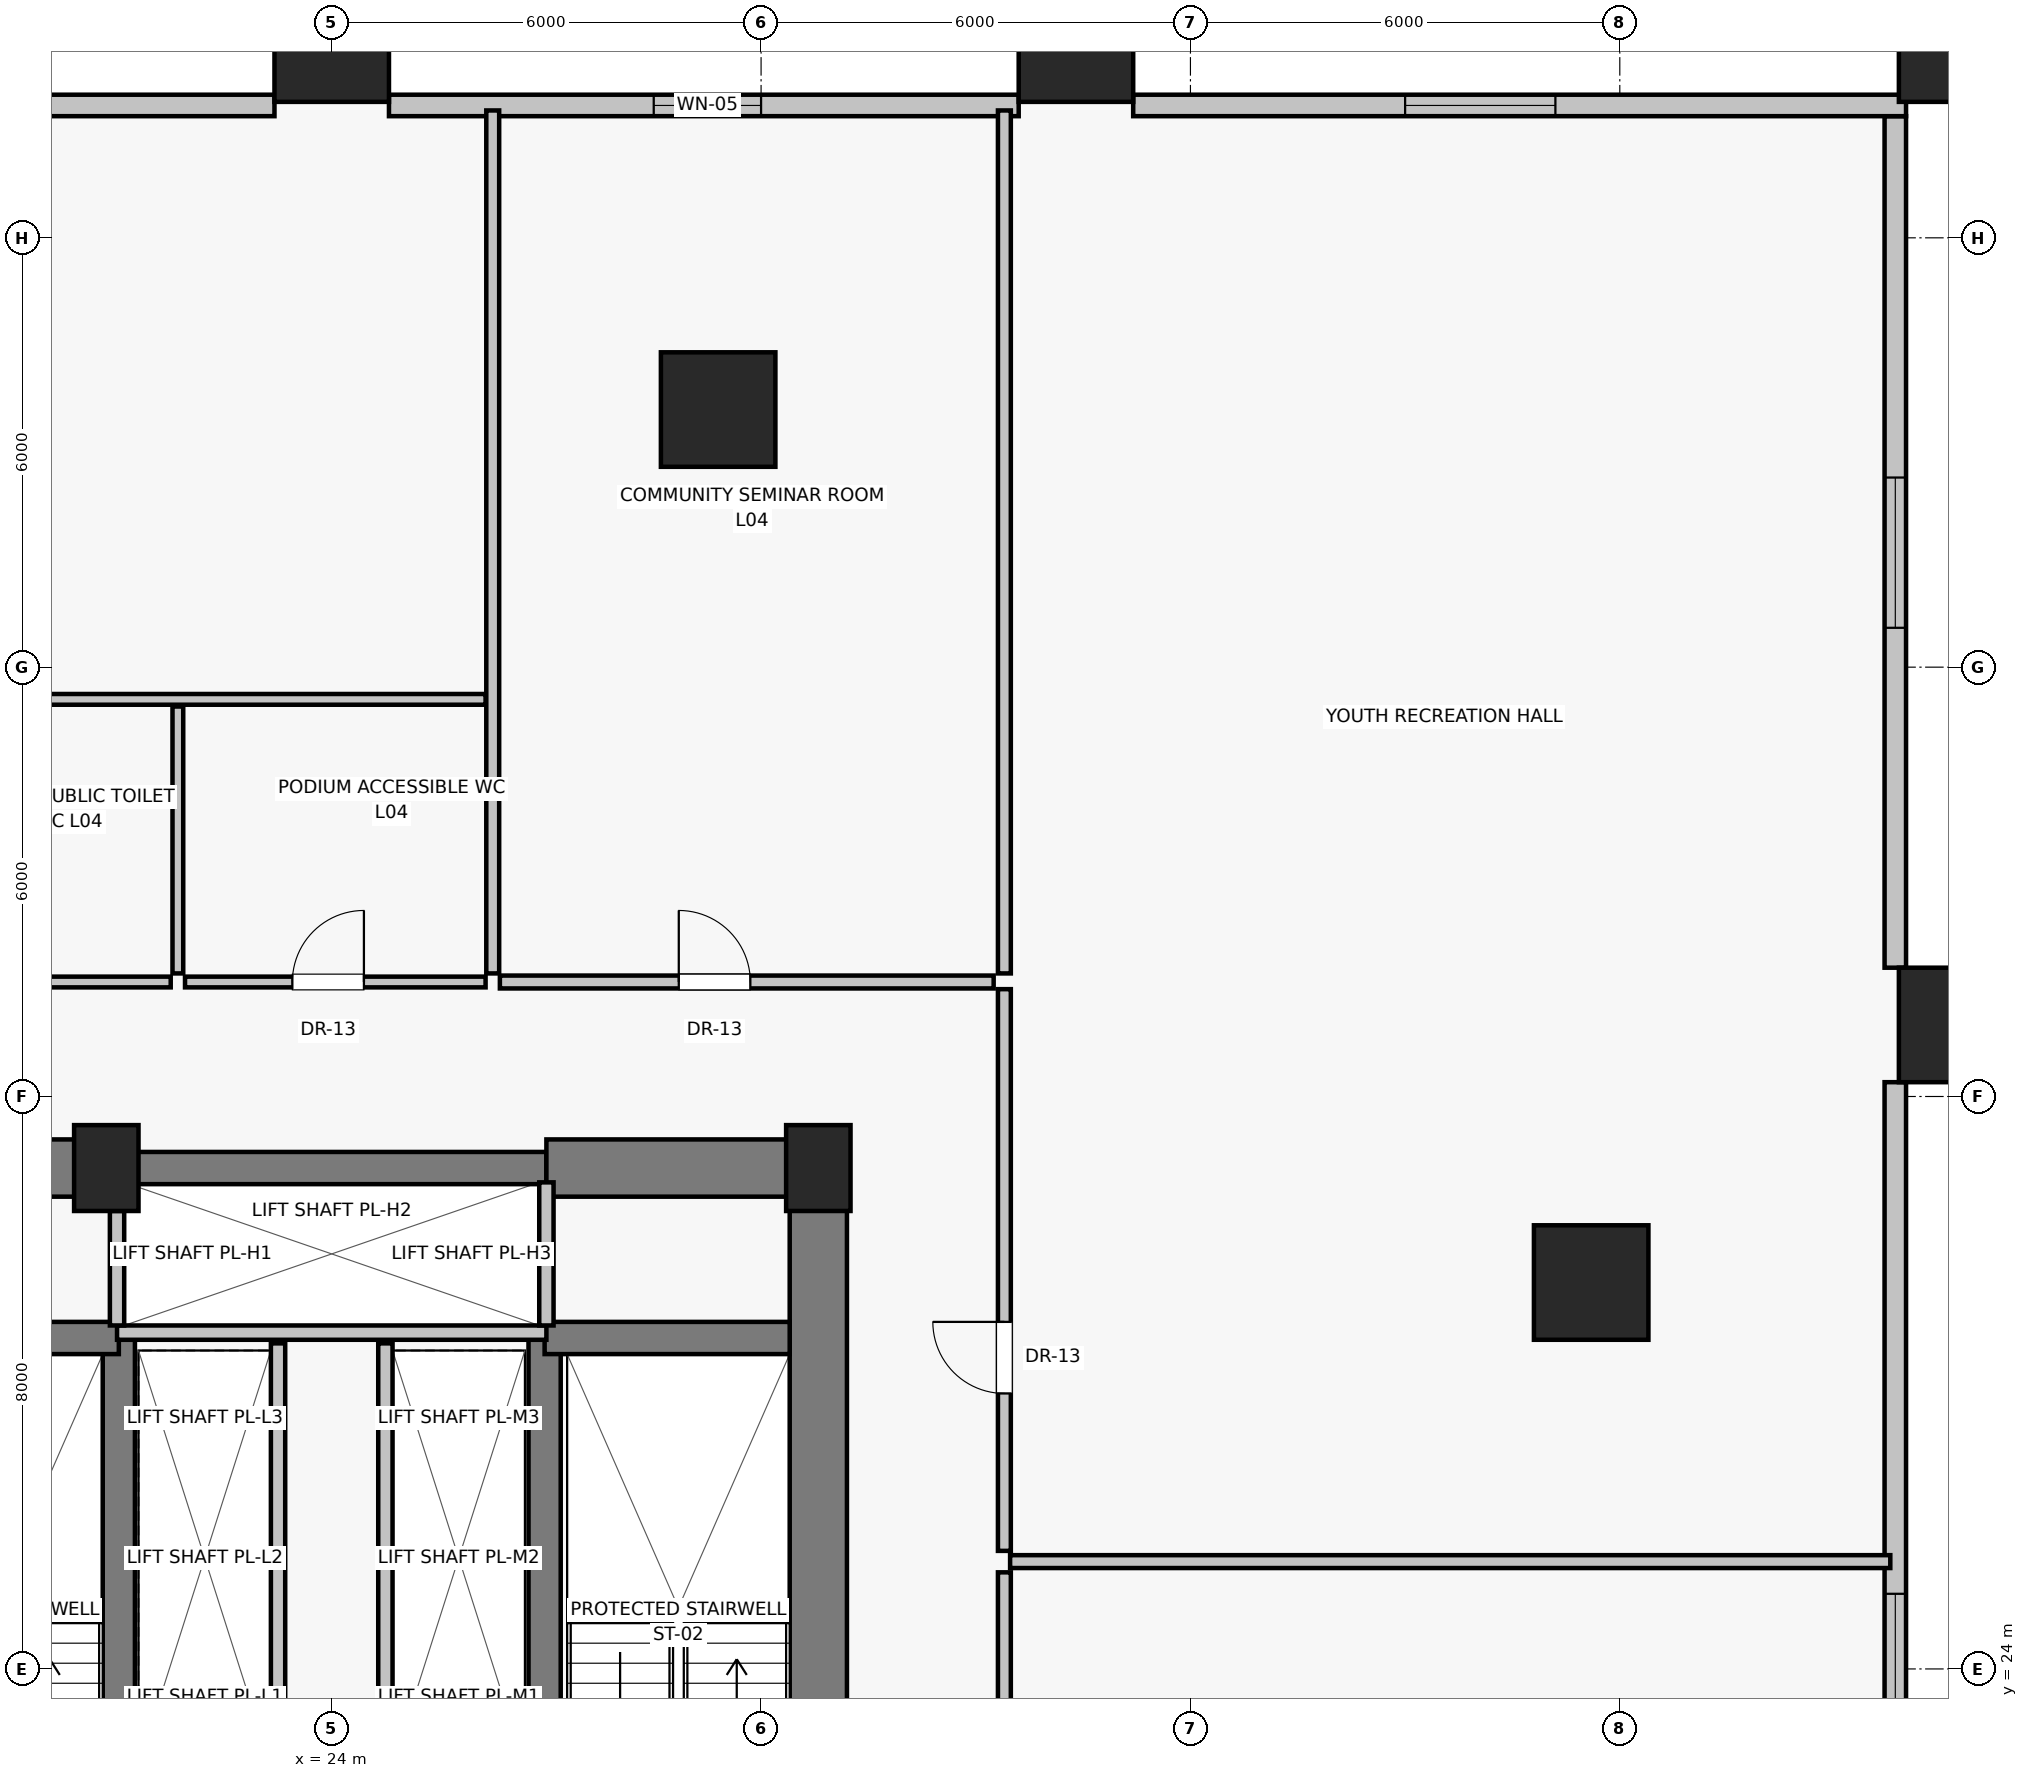
"""IFC4 building model, lengths in metres.
Left out: names, types, materials, properties, quantities, classifications, styles, units other than length and angle.
Written with IfcOpenShell. Run it as: python <this file> out.ifc"""

import sys

from ifc_helpers import new_model, si_unit, direction, frame, frame_2d, origin, origin_2d, place, context, subcontext, project, spatial, rectangle, extrude, source, transform, mapped, element, fill, save


model = new_model("IFC4")
c1 = context("Model", 3, precision=1e-05, world=origin(), true_north=direction((0.0, 1.0)))
c2 = subcontext(c1, "Body", "Model", "MODEL_VIEW")
j1 = project(units=[si_unit("LENGTHUNIT", "METRE"), si_unit("PLANEANGLEUNIT", "RADIAN")], contexts=[c1])
p1 = place(None, origin())
s1 = spatial("IfcSite", under=j1, at=p1, CompositionType="ELEMENT")
p2 = place(p1, origin())
s2 = spatial("IfcBuilding", under=s1, at=p2, CompositionType="ELEMENT")
p3 = place(p2, frame((0.0, 0.0, 18.4)))
s3 = spatial("IfcBuildingStorey", under=s2, at=p3, CompositionType="ELEMENT", Elevation=18.4)
for number, where, z_axis, x_axis in (
    (1, (20.85, 31.0, 0.0), (0.0, 0.0, 1.0), (1.0, 0.0, 0.0)),
    (2, (30.8, 31.0, 0.0), (0.0, 0.0, 1.0), (1.0, 0.0, 0.0)),
):
    element("IfcColumn", number, at=place(p3, frame(where, z_axis=z_axis, x_axis=x_axis)), inside=s3, PredefinedType="PILASTER", context=c2, shape_type="SweptSolid", body=[
        extrude(rectangle(XDim=0.9, YDim=1.2, at=origin_2d()), origin(), (0.0, 0.0, 1.0), 4.4),
    ])
for number, where, z_axis, x_axis in (
    (3, (46.7, 33.0, 0.0), (0.0, 0.0, 1.0), (1.0, 0.0, 0.0)),
    (4, (24.0, 46.7, 0.0), (0.0, 0.0, 1.0), (1.0, 0.0, 0.0)),
    (5, (34.4, 46.7, 0.0), (0.0, 0.0, 1.0), (1.0, 0.0, 0.0)),
    (6, (46.7, 46.7, 0.0), (0.0, 0.0, 1.0), (1.0, 0.0, 0.0)),
    (7, (41.6, 29.4, 0.0), (0.0, 0.0, 1.0), (1.0, 0.0, 0.0)),
    (8, (29.4, 41.6, 0.0), (0.0, 0.0, 1.0), (1.0, 0.0, 0.0)),
):
    element("IfcColumn", number, at=place(p3, frame(where, z_axis=z_axis, x_axis=x_axis)), inside=s3, PredefinedType="COLUMN", context=c2, shape_type="SweptSolid", body=[
        extrude(rectangle(XDim=1.6, YDim=1.6, at=origin_2d()), origin(), (0.0, 0.0, 1.0), 4.4),
    ])
p4 = place(p3, frame((45.85, 15.8, 0.0), z_axis=(0.0, 0.0, 1.0), x_axis=(0.0, 1.0, 0.0)))
e9 = element("IfcWall", 9, at=p4, inside=s3, PredefinedType="SOLIDWALL", context=c2, shape_type="SweptSolid", body=[
    extrude(rectangle(XDim=16.4, YDim=0.3, at=frame_2d((8.2, 0.0))), origin(), (0.0, 0.0, 1.0), 2.95),
])
p5 = place(p4, frame((7.15, 0.0, 0.85)))
e10 = element("IfcOpeningElement", 10, at=p5, cuts=e9, PredefinedType="OPENING", context=c2, shape_type="SweptSolid", body=[
    extrude(rectangle(XDim=2.1, YDim=1.75, at=frame_2d((1.05, 0.875))), frame((0.0, 0.16, 0.0), z_axis=(0.0, -1.0, 0.0), x_axis=(1.0, 0.0, 0.0)), (0.0, 0.0, 1.0), 0.32),
])
p6 = place(p3, frame((45.85, 33.8, 0.0), z_axis=(0.0, 0.0, 1.0), x_axis=(0.0, 1.0, 0.0)))
e11 = element("IfcWall", 11, at=p6, inside=s3, PredefinedType="SOLIDWALL", context=c2, shape_type="SweptSolid", body=[
    extrude(rectangle(XDim=11.9, YDim=0.3, at=frame_2d((5.95, 0.0))), origin(), (0.0, 0.0, 1.0), 2.95),
])
p7 = place(p6, frame((4.75, 0.0, 0.85)))
e12 = element("IfcOpeningElement", 12, at=p7, cuts=e11, PredefinedType="OPENING", context=c2, shape_type="SweptSolid", body=[
    extrude(rectangle(XDim=2.1, YDim=1.75, at=frame_2d((1.05, 0.875))), frame((0.0, 0.16, 0.0), z_axis=(0.0, -1.0, 0.0), x_axis=(1.0, 0.0, 0.0)), (0.0, 0.0, 1.0), 0.32),
])
p8 = place(p3, frame((46.0, 45.85, 0.0), z_axis=(0.0, 0.0, 1.0), x_axis=(-1.0, 0.0, 0.0)))
e13 = element("IfcWall", 13, at=p8, inside=s3, PredefinedType="SOLIDWALL", context=c2, shape_type="SweptSolid", body=[
    extrude(rectangle(XDim=10.8, YDim=0.3, at=frame_2d((5.4, 0.0))), origin(), (0.0, 0.0, 1.0), 2.95),
])
p9 = place(p8, frame((4.9, 0.0, 0.85)))
e14 = element("IfcOpeningElement", 14, at=p9, cuts=e13, PredefinedType="OPENING", context=c2, shape_type="SweptSolid", body=[
    extrude(rectangle(XDim=2.1, YDim=1.75, at=frame_2d((1.05, 0.875))), frame((0.0, 0.16, 0.0), z_axis=(0.0, -1.0, 0.0), x_axis=(1.0, 0.0, 0.0)), (0.0, 0.0, 1.0), 0.32),
])
p10 = place(p3, frame((33.6, 45.85, 0.0), z_axis=(0.0, 0.0, 1.0), x_axis=(-1.0, 0.0, 0.0)))
e15 = element("IfcWall", 15, at=p10, inside=s3, PredefinedType="SOLIDWALL", context=c2, shape_type="SweptSolid", body=[
    extrude(rectangle(XDim=8.8, YDim=0.3, at=frame_2d((4.4, 0.0))), origin(), (0.0, 0.0, 1.0), 2.95),
])
p11 = place(p10, frame((3.6, 0.0, 0.85)))
e16 = element("IfcOpeningElement", 16, at=p11, cuts=e15, PredefinedType="OPENING", context=c2, shape_type="SweptSolid", body=[
    extrude(rectangle(XDim=1.5, YDim=1.6, at=frame_2d((0.75, 0.8))), frame((0.0, 0.16, 0.0), z_axis=(0.0, -1.0, 0.0), x_axis=(1.0, 0.0, 0.0)), (0.0, 0.0, 1.0), 0.32),
])
p12 = place(p3, frame((23.2, 45.85, 0.0), z_axis=(0.0, 0.0, 1.0), x_axis=(-1.0, 0.0, 0.0)))
e17 = element("IfcWall", 17, at=p12, inside=s3, PredefinedType="SOLIDWALL", context=c2, shape_type="SweptSolid", body=[
    extrude(rectangle(XDim=8.8, YDim=0.3, at=frame_2d((4.4, 0.0))), origin(), (0.0, 0.0, 1.0), 2.95),
])
p13 = place(p12, frame((3.6, 0.0, 0.85)))
e18 = element("IfcOpeningElement", 18, at=p13, cuts=e17, PredefinedType="OPENING", context=c2, shape_type="SweptSolid", body=[
    extrude(rectangle(XDim=2.1, YDim=1.75, at=frame_2d((1.05, 0.875))), frame((0.0, 0.16, 0.0), z_axis=(0.0, -1.0, 0.0), x_axis=(1.0, 0.0, 0.0)), (0.0, 0.0, 1.0), 0.32),
])
p14 = place(p3, frame((30.8, 16.8, 0.0), z_axis=(0.0, 0.0, 1.0), x_axis=(0.0, 1.0, 0.0)))
e19 = element("IfcWall", 19, at=p14, inside=s3, PredefinedType="SHEAR", context=c2, shape_type="SweptSolid", body=[
    extrude(rectangle(XDim=14.2, YDim=0.8, at=frame_2d((7.1, 0.0))), origin(), (0.0, 0.0, 1.0), 4.05),
])
p15 = place(p3, frame((17.2, 31.0, 0.0), z_axis=(0.0, 0.0, 1.0), x_axis=(1.0, 0.0, 0.0)))
e20 = element("IfcWall", 20, at=p15, inside=s3, PredefinedType="SHEAR", context=c2, shape_type="SweptSolid", body=[
    extrude(rectangle(XDim=3.8, YDim=0.8, at=frame_2d((1.9, 0.0))), origin(), (0.0, 0.0, 1.0), 4.05),
])
p16 = place(p3, frame((21.0, 31.0, 0.0), z_axis=(0.0, 0.0, 1.0), x_axis=(1.0, 0.0, 0.0)))
e21 = element("IfcWall", 21, at=p16, inside=s3, PredefinedType="SHEAR", context=c2, shape_type="SweptSolid", body=[
    extrude(rectangle(XDim=6.0, YDim=0.45, at=frame_2d((3.0, 0.0))), origin(), (0.0, 0.0, 1.0), 4.05),
])
p17 = place(p3, frame((27.0, 31.0, 0.0), z_axis=(0.0, 0.0, 1.0), x_axis=(1.0, 0.0, 0.0)))
e22 = element("IfcWall", 22, at=p17, inside=s3, PredefinedType="SHEAR", context=c2, shape_type="SweptSolid", body=[
    extrude(rectangle(XDim=3.8, YDim=0.8, at=frame_2d((1.9, 0.0))), origin(), (0.0, 0.0, 1.0), 4.05),
])
for number, where, z_axis, x_axis in (
    (23, (21.025, 19.8, 0.0), (0.0, 0.0, 1.0), (0.0, 1.0, 0.0)),
    (24, (26.975, 19.8, 0.0), (0.0, 0.0, 1.0), (0.0, 1.0, 0.0)),
):
    element("IfcWall", number, at=place(p3, frame(where, z_axis=z_axis, x_axis=x_axis)), inside=s3, PredefinedType="SHEAR", context=c2, shape_type="SweptSolid", body=[
        extrude(rectangle(XDim=8.825, YDim=0.45, at=frame_2d((4.413, 0.0))), origin(), (0.0, 0.0, 1.0), 4.05),
    ])
for number, where, z_axis, x_axis in (
    (25, (17.6, 28.625, 0.0), (0.0, 0.0, 1.0), (1.0, 0.0, 0.0)),
    (26, (26.975, 28.625, 0.0), (0.0, 0.0, 1.0), (1.0, 0.0, 0.0)),
):
    element("IfcWall", number, at=place(p3, frame(where, z_axis=z_axis, x_axis=x_axis)), inside=s3, PredefinedType="SHEAR", context=c2, shape_type="SweptSolid", body=[
        extrude(rectangle(XDim=3.425, YDim=0.45, at=frame_2d((1.712, 0.0))), origin(), (0.0, 0.0, 1.0), 4.05),
    ])
p18 = place(p3, frame((21.0, 28.7, 0.0), z_axis=(0.0, 0.0, 1.0), x_axis=(1.0, 0.0, 0.0)))
e27 = element("IfcWall", 27, at=p18, inside=s3, PredefinedType="SOLIDWALL", context=c2, shape_type="SweptSolid", body=[
    extrude(rectangle(XDim=6.0, YDim=0.2, at=frame_2d((3.0, 0.0))), origin(), (0.0, 0.0, 1.0), 4.05),
])
p19 = place(p3, frame((21.0, 28.8, 0.0), z_axis=(0.0, 0.0, 1.0), x_axis=(0.0, 1.0, 0.0)))
e28 = element("IfcWall", 28, at=p19, inside=s3, PredefinedType="SOLIDWALL", context=c2, shape_type="SweptSolid", body=[
    extrude(rectangle(XDim=1.6, YDim=0.2, at=frame_2d((0.8, 0.0))), origin(), (0.0, 0.0, 1.0), 4.05),
])
p20 = place(p3, frame((27.0, 28.8, 0.0), z_axis=(0.0, 0.0, 1.0), x_axis=(0.0, 1.0, 0.0)))
e29 = element("IfcWall", 29, at=p20, inside=s3, PredefinedType="SOLIDWALL", context=c2, shape_type="SweptSolid", body=[
    extrude(rectangle(XDim=2.0, YDim=0.2, at=frame_2d((1.0, 0.0))), origin(), (0.0, 0.0, 1.0), 4.05),
])
for number, where, z_axis, x_axis in (
    (30, (23.25, 22.6, 0.0), (0.0, 0.0, 1.0), (0.0, 1.0, 0.0)),
    (31, (24.75, 22.6, 0.0), (0.0, 0.0, 1.0), (0.0, 1.0, 0.0)),
):
    element("IfcWall", number, at=place(p3, frame(where, z_axis=z_axis, x_axis=x_axis)), inside=s3, PredefinedType="SOLIDWALL", context=c2, shape_type="SweptSolid", body=[
        extrude(rectangle(XDim=5.95, YDim=0.2, at=frame_2d((2.975, 0.0))), origin(), (0.0, 0.0, 1.0), 4.05),
    ])
p21 = place(p3, frame((33.4, 14.3, 0.0), z_axis=(0.0, 0.0, 1.0), x_axis=(0.0, 1.0, 0.0)))
e32 = element("IfcWall", 32, at=p21, inside=s3, PredefinedType="PARTITIONING", context=c2, shape_type="SweptSolid", body=[
    extrude(rectangle(XDim=11.05, YDim=0.18, at=frame_2d((5.525, 0.0))), origin(), (0.0, 0.0, 1.0), 4.05),
])
p22 = place(p21, frame((2.2, 0.0, 0.0)))
e33 = element("IfcOpeningElement", 33, at=p22, cuts=e32, PredefinedType="OPENING", context=c2, shape_type="SweptSolid", body=[
    extrude(rectangle(XDim=1.0, YDim=2.01, at=frame_2d((0.5, 1.005))), frame((0.0, 0.1, 0.0), z_axis=(0.0, -1.0, 0.0), x_axis=(1.0, 0.0, 0.0)), (0.0, 0.0, 1.0), 0.2),
])
p23 = place(p3, frame((33.4, 25.65, 0.0), z_axis=(0.0, 0.0, 1.0), x_axis=(0.0, 1.0, 0.0)))
e34 = element("IfcWall", 34, at=p23, inside=s3, PredefinedType="PARTITIONING", context=c2, shape_type="SweptSolid", body=[
    extrude(rectangle(XDim=7.85, YDim=0.18, at=frame_2d((3.925, 0.0))), origin(), (0.0, 0.0, 1.0), 4.05),
])
p24 = place(p23, frame((2.2, 0.0, 0.0)))
e35 = element("IfcOpeningElement", 35, at=p24, cuts=e34, PredefinedType="OPENING", context=c2, shape_type="SweptSolid", body=[
    extrude(rectangle(XDim=1.0, YDim=2.01, at=frame_2d((0.5, 1.005))), frame((0.0, 0.1, 0.0), z_axis=(0.0, -1.0, 0.0), x_axis=(1.0, 0.0, 0.0)), (0.0, 0.0, 1.0), 0.2),
])
p25 = place(p3, frame((33.48, 25.5, 0.0), z_axis=(0.0, 0.0, 1.0), x_axis=(1.0, 0.0, 0.0)))
e36 = element("IfcWall", 36, at=p25, inside=s3, PredefinedType="PARTITIONING", context=c2, shape_type="SweptSolid", body=[
    extrude(rectangle(XDim=12.3, YDim=0.18, at=frame_2d((6.15, 0.0))), origin(), (0.0, 0.0, 1.0), 4.05),
])
p26 = place(p3, frame((17.0, 33.6, 0.0), z_axis=(0.0, 0.0, 1.0), x_axis=(1.0, 0.0, 0.0)))
e37 = element("IfcWall", 37, at=p26, inside=s3, PredefinedType="PARTITIONING", context=c2, shape_type="SweptSolid", body=[
    extrude(rectangle(XDim=4.75, YDim=0.15, at=frame_2d((2.375, 0.0))), origin(), (0.0, 0.0, 1.0), 4.05),
])
p27 = place(p26, frame((1.8, 0.0, 0.0)))
e38 = element("IfcOpeningElement", 38, at=p27, cuts=e37, PredefinedType="OPENING", context=c2, shape_type="SweptSolid", body=[
    extrude(rectangle(XDim=0.86, YDim=2.01, at=frame_2d((0.43, 1.005))), frame((0.0, 0.085, 0.0), z_axis=(0.0, -1.0, 0.0), x_axis=(1.0, 0.0, 0.0)), (0.0, 0.0, 1.0), 0.17),
])
p28 = place(p3, frame((21.95, 33.6, 0.0), z_axis=(0.0, 0.0, 1.0), x_axis=(1.0, 0.0, 0.0)))
e39 = element("IfcWall", 39, at=p28, inside=s3, PredefinedType="PARTITIONING", context=c2, shape_type="SweptSolid", body=[
    extrude(rectangle(XDim=4.2, YDim=0.15, at=frame_2d((2.1, 0.0))), origin(), (0.0, 0.0, 1.0), 4.05),
])
p29 = place(p28, frame((1.5, 0.0, 0.0)))
e40 = element("IfcOpeningElement", 40, at=p29, cuts=e39, PredefinedType="OPENING", context=c2, shape_type="SweptSolid", body=[
    extrude(rectangle(XDim=1.0, YDim=2.01, at=frame_2d((0.5, 1.005))), frame((0.0, 0.085, 0.0), z_axis=(0.0, -1.0, 0.0), x_axis=(1.0, 0.0, 0.0)), (0.0, 0.0, 1.0), 0.17),
])
p30 = place(p3, frame((26.35, 33.6, 0.0), z_axis=(0.0, 0.0, 1.0), x_axis=(1.0, 0.0, 0.0)))
e41 = element("IfcWall", 41, at=p30, inside=s3, PredefinedType="PARTITIONING", context=c2, shape_type="SweptSolid", body=[
    extrude(rectangle(XDim=6.9, YDim=0.18, at=frame_2d((3.45, 0.0))), origin(), (0.0, 0.0, 1.0), 4.05),
])
p31 = place(p30, frame((2.5, 0.0, 0.0)))
e42 = element("IfcOpeningElement", 42, at=p31, cuts=e41, PredefinedType="OPENING", context=c2, shape_type="SweptSolid", body=[
    extrude(rectangle(XDim=1.0, YDim=2.01, at=frame_2d((0.5, 1.005))), frame((0.0, 0.1, 0.0), z_axis=(0.0, -1.0, 0.0), x_axis=(1.0, 0.0, 0.0)), (0.0, 0.0, 1.0), 0.2),
])
p32 = place(p3, frame((21.85, 33.72, 0.0), z_axis=(0.0, 0.0, 1.0), x_axis=(0.0, 1.0, 0.0)))
e43 = element("IfcWall", 43, at=p32, inside=s3, PredefinedType="PARTITIONING", context=c2, shape_type="SweptSolid", body=[
    extrude(rectangle(XDim=3.73, YDim=0.15, at=frame_2d((1.865, 0.0))), origin(), (0.0, 0.0, 1.0), 4.05),
])
for number, where, z_axis, x_axis in (
    (44, (26.25, 33.72, 0.0), (0.0, 0.0, 1.0), (0.0, 1.0, 0.0)),
    (45, (33.4, 33.72, 0.0), (0.0, 0.0, 1.0), (0.0, 1.0, 0.0)),
):
    element("IfcWall", number, at=place(p3, frame(where, z_axis=z_axis, x_axis=x_axis)), inside=s3, PredefinedType="PARTITIONING", context=c2, shape_type="SweptSolid", body=[
        extrude(rectangle(XDim=12.06, YDim=0.18, at=frame_2d((6.03, 0.0))), origin(), (0.0, 0.0, 1.0), 4.05),
    ])
p33 = place(p3, frame((17.0, 37.55, 0.0), z_axis=(0.0, 0.0, 1.0), x_axis=(1.0, 0.0, 0.0)))
e46 = element("IfcWall", 46, at=p33, inside=s3, PredefinedType="PARTITIONING", context=c2, shape_type="SweptSolid", body=[
    extrude(rectangle(XDim=9.15, YDim=0.15, at=frame_2d((4.575, 0.0))), origin(), (0.0, 0.0, 1.0), 4.05),
])
m1 = source(origin(), c2, "Body", "SweptSolid", [
    extrude(rectangle(XDim=2.1, YDim=1.75, at=frame_2d((1.05, 0.875))), frame((0.0, 0.03, 0.0), z_axis=(0.0, -1.0, 0.0), x_axis=(1.0, 0.0, 0.0)), (0.0, 0.0, 1.0), 0.06),
])
p34 = place(p5, origin())
e47 = element("IfcWindow", 47, at=p34, inside=s3, PartitioningType="DOUBLE_PANEL_VERTICAL", PredefinedType="WINDOW", context=c2, shape_type="MappedRepresentation", body=[
    mapped(m1, transform((0.0, 0.0, 0.0), scale=1.0)),
])
fill(e10, e47)
p35 = place(p7, origin())
e48 = element("IfcWindow", 48, at=p35, inside=s3, PartitioningType="DOUBLE_PANEL_VERTICAL", PredefinedType="WINDOW", context=c2, shape_type="MappedRepresentation", body=[
    mapped(m1, transform((0.0, 0.0, 0.0), scale=1.0)),
])
fill(e12, e48)
p36 = place(p9, origin())
e49 = element("IfcWindow", 49, at=p36, inside=s3, PartitioningType="DOUBLE_PANEL_VERTICAL", PredefinedType="WINDOW", context=c2, shape_type="MappedRepresentation", body=[
    mapped(m1, transform((0.0, 0.0, 0.0), scale=1.0)),
])
fill(e14, e49)
m2 = source(origin(), c2, "Body", "SweptSolid", [
    extrude(rectangle(XDim=1.5, YDim=1.6, at=frame_2d((0.75, 0.8))), frame((0.0, 0.03, 0.0), z_axis=(0.0, -1.0, 0.0), x_axis=(1.0, 0.0, 0.0)), (0.0, 0.0, 1.0), 0.06),
])
p37 = place(p11, origin())
e50 = element("IfcWindow", 50, at=p37, inside=s3, PartitioningType="DOUBLE_PANEL_VERTICAL", PredefinedType="WINDOW", context=c2, shape_type="MappedRepresentation", body=[
    mapped(m2, transform((0.0, 0.0, 0.0), scale=1.0)),
])
fill(e16, e50)
m3 = source(origin(), c2, "Body", "SweptSolid", [
    extrude(rectangle(XDim=1.0, YDim=2.01, at=frame_2d((0.5, 1.005))), frame((0.0, 0.025, 0.0), z_axis=(0.0, -1.0, 0.0), x_axis=(1.0, 0.0, 0.0)), (0.0, 0.0, 1.0), 0.05),
])
p38 = place(p24, origin())
e51 = element("IfcDoor", 51, at=p38, inside=s3, OperationType="SINGLE_SWING_RIGHT", PredefinedType="DOOR", context=c2, shape_type="MappedRepresentation", body=[
    mapped(m3, transform((0.0, 0.0, 0.0), scale=1.0)),
])
fill(e35, e51)
p39 = place(p29, origin())
e52 = element("IfcDoor", 52, at=p39, inside=s3, OperationType="SINGLE_SWING_RIGHT", PredefinedType="DOOR", context=c2, shape_type="MappedRepresentation", body=[
    mapped(m3, transform((0.0, 0.0, 0.0), scale=1.0)),
])
fill(e40, e52)
p40 = place(p31, origin())
e53 = element("IfcDoor", 53, at=p40, inside=s3, OperationType="SINGLE_SWING_LEFT", PredefinedType="DOOR", context=c2, shape_type="MappedRepresentation", body=[
    mapped(m3, transform((0.0, 0.0, 0.0), scale=1.0)),
])
fill(e42, e53)
save(model, sys.argv[1])
